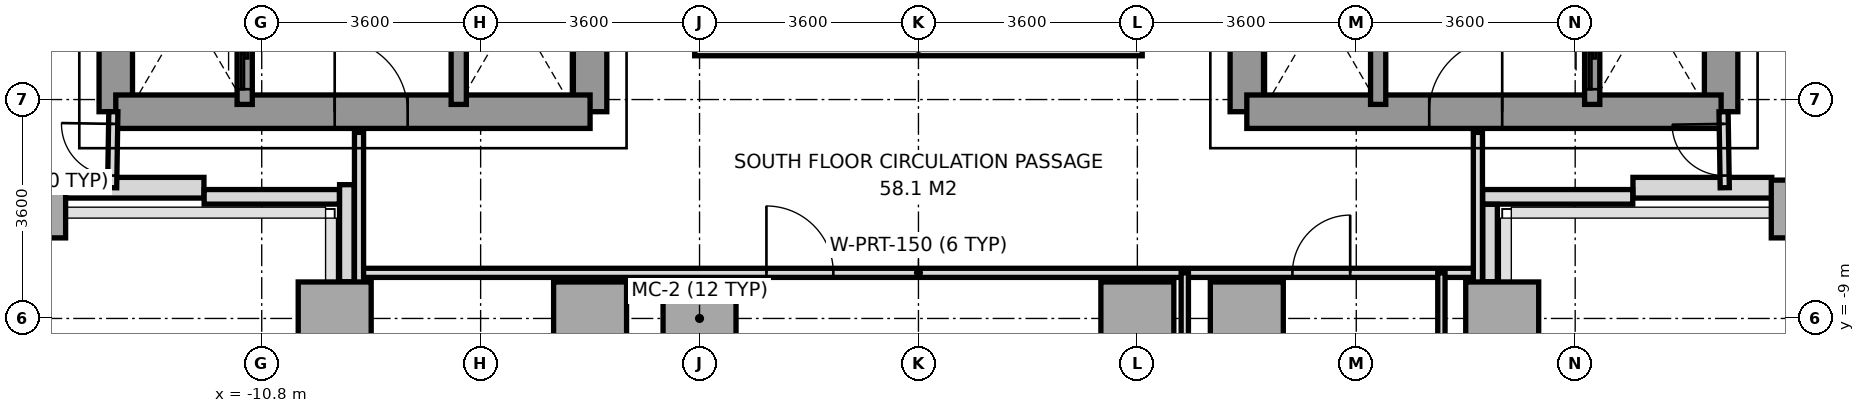
"""IFC4 building model, lengths in metres.
Left out: names, types, materials, properties, quantities, classifications, styles, units other than length and angle.
Written with IfcOpenShell. Run it as: python <this file> out.ifc"""

import sys

from ifc_helpers import new_model, si_unit, direction, frame, frame_2d, origin, origin_2d, place, context, subcontext, project, spatial, rectangle, extrude, source, transform, mapped, element, fill, save


model = new_model("IFC4")
c1 = context("Model", 3, precision=1e-05, world=origin(), true_north=direction((0.0, 1.0)))
c2 = subcontext(c1, "Body", "Model", "MODEL_VIEW")
j1 = project(units=[si_unit("LENGTHUNIT", "METRE"), si_unit("PLANEANGLEUNIT", "RADIAN")], contexts=[c1])
p1 = place(None, origin())
s1 = spatial("IfcSite", under=j1, at=p1, CompositionType="ELEMENT")
p2 = place(p1, origin())
s2 = spatial("IfcBuilding", under=s1, at=p2, CompositionType="ELEMENT")
p3 = place(p2, frame((0.0, 0.0, 64.6)))
s3 = spatial("IfcBuildingStorey", under=s2, at=p3, CompositionType="ELEMENT", Elevation=64.6)
m1 = source(origin(), c2, "Body", "SweptSolid", [
    extrude(rectangle(XDim=0.75, YDim=0.95, at=origin_2d()), origin(), (0.0, 0.0, 1.0), 3.2),
])
p4 = place(p3, frame((-14.4, -7.2, 0.0), z_axis=(0.0, 0.0, 1.0), x_axis=(1.0, 0.0, 0.0)))
e1 = element("IfcColumn", 1, at=p4, inside=s3, PredefinedType="COLUMN", context=c2, shape_type="MappedRepresentation", body=[
    mapped(m1, transform((0.0, 0.0, 0.0), x_axis=(1.0, 0.0, 0.0), y_axis=(0.0, 1.0, 0.0), z_axis=(0.0, 0.0, 1.0), scale=1.0)),
])
m2 = source(origin(), c2, "Body", "SweptSolid", [
    extrude(rectangle(XDim=1.2, YDim=1.2, at=origin_2d()), origin(), (0.0, 0.0, 1.0), 3.2),
])
for number, where, z_axis, x_axis in (
    (2, (-9.6, -9.0, 0.0), (0.0, 0.0, 1.0), (1.0, 0.0, 0.0)),
    (3, (-5.4, -9.0, 0.0), (0.0, 0.0, 1.0), (1.0, 0.0, 0.0)),
    (4, (-3.6, -9.0, 0.0), (0.0, 0.0, 1.0), (1.0, 0.0, 0.0)),
    (5, (3.6, -9.0, 0.0), (0.0, 0.0, 1.0), (1.0, 0.0, 0.0)),
    (6, (5.4, -9.0, 0.0), (0.0, 0.0, 1.0), (1.0, 0.0, 0.0)),
    (7, (9.6, -9.0, 0.0), (0.0, 0.0, 1.0), (1.0, 0.0, 0.0)),
):
    element("IfcColumn", number, at=place(p3, frame(where, z_axis=z_axis, x_axis=x_axis)), inside=s3, PredefinedType="COLUMN", context=c2, shape_type="MappedRepresentation", body=[
        mapped(m2, transform((0.0, 0.0, 0.0), x_axis=(1.0, 0.0, 0.0), y_axis=(0.0, 1.0, 0.0), z_axis=(0.0, 0.0, 1.0), scale=1.0)),
    ])
p5 = place(p3, frame((14.4, -7.2, 0.0), z_axis=(0.0, 0.0, 1.0), x_axis=(1.0, 0.0, 0.0)))
e8 = element("IfcColumn", 8, at=p5, inside=s3, PredefinedType="COLUMN", context=c2, shape_type="MappedRepresentation", body=[
    mapped(m1, transform((0.0, 0.0, 0.0), x_axis=(1.0, 0.0, 0.0), y_axis=(0.0, 1.0, 0.0), z_axis=(0.0, 0.0, 1.0), scale=1.0)),
])
for number, where, z_axis, x_axis in (
    (9, (-14.033, -6.85, 0.0), (0.0, 0.0, 1.0), (1.0, 0.0, 0.0)),
    (10, (11.75, -6.85, 0.0), (0.0, 0.0, 1.0), (1.0, 0.0, 0.0)),
):
    element("IfcWall", number, at=place(p3, frame(where, z_axis=z_axis, x_axis=x_axis)), inside=s3, PredefinedType="SOLIDWALL", context=c2, shape_type="SweptSolid", body=[
        extrude(rectangle(XDim=2.283, YDim=0.34, at=frame_2d((1.142, 0.0))), origin(), (0.0, 0.0, 1.0), 3.2),
    ])
p6 = place(p3, frame((11.747, -7.0, 0.0), z_axis=(0.0, 0.0, 1.0), x_axis=(-1.0, 0.0, 0.0)))
e11 = element("IfcWall", 11, at=p6, inside=s3, PredefinedType="PARAPET", context=c2, shape_type="SweptSolid", body=[
    extrude(rectangle(XDim=2.469, YDim=0.24, at=frame_2d((1.234, 0.0))), origin(), (0.0, 0.0, 1.0), 1.15),
])
p7 = place(p3, frame((9.4, -7.123, 0.0), z_axis=(0.0, 0.0, 1.0), x_axis=(0.0, -1.0, 0.0)))
e12 = element("IfcWall", 12, at=p7, inside=s3, PredefinedType="PARAPET", context=c2, shape_type="SweptSolid", body=[
    extrude(rectangle(XDim=1.274, YDim=0.24, at=frame_2d((0.637, 0.0))), origin(), (0.0, 0.0, 1.0), 1.15),
])
p8 = place(p3, frame((-9.4, -8.397, 0.0), z_axis=(0.0, 0.0, 1.0), x_axis=(0.0, 1.0, 0.0)))
e13 = element("IfcWall", 13, at=p8, inside=s3, PredefinedType="PARAPET", context=c2, shape_type="SweptSolid", body=[
    extrude(rectangle(XDim=1.597, YDim=0.24, at=frame_2d((0.798, 0.0))), origin(), (0.0, 0.0, 1.0), 1.15),
])
p9 = place(p3, frame((-9.523, -7.0, 0.0), z_axis=(0.0, 0.0, 1.0), x_axis=(-1.0, 0.0, 0.0)))
e14 = element("IfcWall", 14, at=p9, inside=s3, PredefinedType="PARAPET", context=c2, shape_type="SweptSolid", body=[
    extrude(rectangle(XDim=2.224, YDim=0.24, at=frame_2d((1.112, 0.0))), origin(), (0.0, 0.0, 1.0), 1.15),
])
p10 = place(p3, frame((-13.2, -5.6, 0.0), z_axis=(0.0, 0.0, 1.0), x_axis=(0.0, 1.0, 0.0)))
e15 = element("IfcWall", 15, at=p10, inside=s3, PredefinedType="SHEAR", context=c2, shape_type="SweptSolid", body=[
    extrude(rectangle(XDim=11.2, YDim=0.55, at=frame_2d((5.6, 0.0))), origin(), (0.0, 0.0, 1.0), 3.2),
])
p11 = place(p3, frame((-5.4, -5.6, 0.0), z_axis=(0.0, 0.0, 1.0), x_axis=(0.0, 1.0, 0.0)))
e16 = element("IfcWall", 16, at=p11, inside=s3, PredefinedType="SHEAR", context=c2, shape_type="SweptSolid", body=[
    extrude(rectangle(XDim=12.5, YDim=0.55, at=frame_2d((6.25, 0.0))), origin(), (0.0, 0.0, 1.0), 3.2),
])
p12 = place(p11, frame((4.55, 0.0, 0.0)))
e17 = element("IfcOpeningElement", 17, at=p12, cuts=e16, PredefinedType="OPENING", context=c2, shape_type="SweptSolid", body=[
    extrude(rectangle(XDim=1.2, YDim=2.2, at=frame_2d((0.6, 1.1))), frame((0.0, 0.285, 0.0), z_axis=(0.0, -1.0, 0.0), x_axis=(1.0, 0.0, 0.0)), (0.0, 0.0, 1.0), 0.57),
])
p13 = place(p3, frame((-13.2, -5.6, 0.0), z_axis=(0.0, 0.0, 1.0), x_axis=(1.0, 0.0, 0.0)))
e18 = element("IfcWall", 18, at=p13, inside=s3, PredefinedType="SHEAR", context=c2, shape_type="SweptSolid", body=[
    extrude(rectangle(XDim=7.8, YDim=0.55, at=frame_2d((3.9, 0.0))), origin(), (0.0, 0.0, 1.0), 3.2),
])
p14 = place(p13, frame((3.6, 0.0, 0.0)))
e19 = element("IfcOpeningElement", 19, at=p14, cuts=e18, PredefinedType="OPENING", context=c2, shape_type="SweptSolid", body=[
    extrude(rectangle(XDim=1.2, YDim=2.2, at=frame_2d((0.6, 1.1))), frame((0.0, 0.285, 0.0), z_axis=(0.0, -1.0, 0.0), x_axis=(1.0, 0.0, 0.0)), (0.0, 0.0, 1.0), 0.57),
])
p15 = place(p3, frame((13.2, -5.6, 0.0), z_axis=(0.0, 0.0, 1.0), x_axis=(0.0, 1.0, 0.0)))
e20 = element("IfcWall", 20, at=p15, inside=s3, PredefinedType="SHEAR", context=c2, shape_type="SweptSolid", body=[
    extrude(rectangle(XDim=11.2, YDim=0.55, at=frame_2d((5.6, 0.0))), origin(), (0.0, 0.0, 1.0), 3.2),
])
p16 = place(p3, frame((5.4, -5.6, 0.0), z_axis=(0.0, 0.0, 1.0), x_axis=(0.0, 1.0, 0.0)))
e21 = element("IfcWall", 21, at=p16, inside=s3, PredefinedType="SHEAR", context=c2, shape_type="SweptSolid", body=[
    extrude(rectangle(XDim=12.5, YDim=0.55, at=frame_2d((6.25, 0.0))), origin(), (0.0, 0.0, 1.0), 3.2),
])
p17 = place(p16, frame((4.55, 0.0, 0.0)))
e22 = element("IfcOpeningElement", 22, at=p17, cuts=e21, PredefinedType="OPENING", context=c2, shape_type="SweptSolid", body=[
    extrude(rectangle(XDim=1.2, YDim=2.2, at=frame_2d((0.6, 1.1))), frame((0.0, 0.285, 0.0), z_axis=(0.0, -1.0, 0.0), x_axis=(1.0, 0.0, 0.0)), (0.0, 0.0, 1.0), 0.57),
])
p18 = place(p16, frame((7.88, 0.0, 0.0)))
e23 = element("IfcOpeningElement", 23, at=p18, cuts=e21, PredefinedType="OPENING", context=c2, shape_type="SweptSolid", body=[
    extrude(rectangle(XDim=0.8, YDim=2.1, at=frame_2d((0.4, 1.05))), frame((0.0, 0.285, 0.0), z_axis=(0.0, -1.0, 0.0), x_axis=(1.0, 0.0, 0.0)), (0.0, 0.0, 1.0), 0.57),
])
p19 = place(p3, frame((5.4, -5.6, 0.0), z_axis=(0.0, 0.0, 1.0), x_axis=(1.0, 0.0, 0.0)))
e24 = element("IfcWall", 24, at=p19, inside=s3, PredefinedType="SHEAR", context=c2, shape_type="SweptSolid", body=[
    extrude(rectangle(XDim=7.8, YDim=0.55, at=frame_2d((3.9, 0.0))), origin(), (0.0, 0.0, 1.0), 3.2),
])
p20 = place(p19, frame((3.0, 0.0, 0.0)))
e25 = element("IfcOpeningElement", 25, at=p20, cuts=e24, PredefinedType="OPENING", context=c2, shape_type="SweptSolid", body=[
    extrude(rectangle(XDim=1.2, YDim=2.2, at=frame_2d((0.6, 1.1))), frame((0.0, 0.285, 0.0), z_axis=(0.0, -1.0, 0.0), x_axis=(1.0, 0.0, 0.0)), (0.0, 0.0, 1.0), 0.57),
])
p21 = place(p3, frame((-11.08, -5.48, 0.0), z_axis=(0.0, 0.0, 1.0), x_axis=(0.0, 1.0, 0.0)))
e26 = element("IfcWall", 26, at=p21, inside=s3, PredefinedType="SOLIDWALL", context=c2, shape_type="SweptSolid", body=[
    extrude(rectangle(XDim=1.6, YDim=0.25, at=frame_2d((0.8, 0.0))), origin(), (0.0, 0.0, 1.0), 3.2),
])
p22 = place(p21, frame((0.25, 0.0, 0.0)))
e27 = element("IfcOpeningElement", 27, at=p22, cuts=e26, PredefinedType="OPENING", context=c2, shape_type="SweptSolid", body=[
    extrude(rectangle(XDim=1.1, YDim=2.2, at=frame_2d((0.55, 1.1))), frame((0.0, 0.135, 0.0), z_axis=(0.0, -1.0, 0.0), x_axis=(1.0, 0.0, 0.0)), (0.0, 0.0, 1.0), 0.27),
])
p23 = place(p3, frame((11.08, -5.48, 0.0), z_axis=(0.0, 0.0, 1.0), x_axis=(0.0, 1.0, 0.0)))
e28 = element("IfcWall", 28, at=p23, inside=s3, PredefinedType="SOLIDWALL", context=c2, shape_type="SweptSolid", body=[
    extrude(rectangle(XDim=1.6, YDim=0.25, at=frame_2d((0.8, 0.0))), origin(), (0.0, 0.0, 1.0), 3.2),
])
p24 = place(p23, frame((0.25, 0.0, 0.0)))
e29 = element("IfcOpeningElement", 29, at=p24, cuts=e28, PredefinedType="OPENING", context=c2, shape_type="SweptSolid", body=[
    extrude(rectangle(XDim=1.1, YDim=2.2, at=frame_2d((0.55, 1.1))), frame((0.0, 0.135, 0.0), z_axis=(0.0, -1.0, 0.0), x_axis=(1.0, 0.0, 0.0)), (0.0, 0.0, 1.0), 0.27),
])
for number, where, z_axis, x_axis in (
    (30, (-7.56, -5.48, 0.0), (0.0, 0.0, 1.0), (0.0, 1.0, 0.0)),
    (31, (7.56, -5.48, 0.0), (0.0, 0.0, 1.0), (0.0, 1.0, 0.0)),
):
    element("IfcWall", number, at=place(p3, frame(where, z_axis=z_axis, x_axis=x_axis)), inside=s3, PredefinedType="SOLIDWALL", context=c2, shape_type="SweptSolid", body=[
        extrude(rectangle(XDim=1.6, YDim=0.25, at=frame_2d((0.8, 0.0))), origin(), (0.0, 0.0, 1.0), 3.2),
    ])
p25 = place(p3, frame((-9.2, -8.25, 0.0), z_axis=(0.0, 0.0, 1.0), x_axis=(1.0, 0.0, 0.0)))
e32 = element("IfcWall", 32, at=p25, inside=s3, PredefinedType="PARTITIONING", context=c2, shape_type="SweptSolid", body=[
    extrude(rectangle(XDim=18.4, YDim=0.15, at=frame_2d((9.2, 0.0))), origin(), (0.0, 0.0, 1.0), 2.7),
])
p26 = place(p25, frame((15.35, 0.0, 0.0)))
e33 = element("IfcOpeningElement", 33, at=p26, cuts=e32, PredefinedType="OPENING", context=c2, shape_type="SweptSolid", body=[
    extrude(rectangle(XDim=0.95, YDim=2.15, at=frame_2d((0.475, 1.075))), frame((0.0, 0.085, 0.0), z_axis=(0.0, -1.0, 0.0), x_axis=(1.0, 0.0, 0.0)), (0.0, 0.0, 1.0), 0.17),
])
p27 = place(p25, frame((6.7, 0.0, 0.0)))
e34 = element("IfcOpeningElement", 34, at=p27, cuts=e32, PredefinedType="OPENING", context=c2, shape_type="SweptSolid", body=[
    extrude(rectangle(XDim=1.1, YDim=2.2, at=frame_2d((0.55, 1.1))), frame((0.0, 0.085, 0.0), z_axis=(0.0, -1.0, 0.0), x_axis=(1.0, 0.0, 0.0)), (0.0, 0.0, 1.0), 0.17),
])
for number, where, z_axis, x_axis in (
    (35, (-9.2, -15.68, 0.0), (0.0, 0.0, 1.0), (0.0, 1.0, 0.0)),
    (36, (9.2, -15.68, 0.0), (0.0, 0.0, 1.0), (0.0, 1.0, 0.0)),
):
    element("IfcWall", number, at=place(p3, frame(where, z_axis=z_axis, x_axis=x_axis)), inside=s3, PredefinedType="PARTITIONING", context=c2, shape_type="SweptSolid", body=[
        extrude(rectangle(XDim=9.74, YDim=0.15, at=frame_2d((4.87, 0.0))), origin(), (0.0, 0.0, 1.0), 2.65),
    ])
p28 = place(p3, frame((4.38, -11.8, 0.0), z_axis=(0.0, 0.0, 1.0), x_axis=(0.0, 1.0, 0.0)))
e37 = element("IfcWall", 37, at=p28, inside=s3, PredefinedType="PARTITIONING", context=c2, shape_type="SweptSolid", body=[
    extrude(rectangle(XDim=3.55, YDim=0.12, at=frame_2d((1.775, 0.0))), origin(), (0.0, 0.0, 1.0), 3.2),
])
p29 = place(p3, frame((8.6, -11.8, 0.0), z_axis=(0.0, 0.0, 1.0), x_axis=(0.0, 1.0, 0.0)))
e38 = element("IfcWall", 38, at=p29, inside=s3, PredefinedType="PARTITIONING", context=c2, shape_type="SweptSolid", body=[
    extrude(rectangle(XDim=3.55, YDim=0.12, at=frame_2d((1.775, 0.0))), origin(), (0.0, 0.0, 1.0), 2.65),
])
p30 = place(p3, frame((-13.26, -6.85, 0.0), z_axis=(0.0, 0.0, 1.0), x_axis=(0.016013571389, 0.999871774545, 0.0)))
e39 = element("IfcWall", 39, at=p30, inside=s3, PredefinedType="PARTITIONING", context=c2, shape_type="SweptSolid", body=[
    extrude(rectangle(XDim=1.25, YDim=0.15, at=frame_2d((0.625, 0.0))), origin(), (0.0, 0.0, 1.0), 3.2),
])
p31 = place(p30, frame((0.2, 0.0, 0.0)))
e40 = element("IfcOpeningElement", 40, at=p31, cuts=e39, PredefinedType="OPENING", context=c2, shape_type="SweptSolid", body=[
    extrude(rectangle(XDim=0.85, YDim=2.1, at=frame_2d((0.425, 1.05))), frame((0.0, 0.085, 0.0), z_axis=(0.0, -1.0, 0.0), x_axis=(1.0, 0.0, 0.0)), (0.0, 0.0, 1.0), 0.17),
])
p32 = place(p3, frame((13.26, -6.85, 0.0), z_axis=(0.0, 0.0, 1.0), x_axis=(-0.016013571389, 0.999871774545, 0.0)))
e41 = element("IfcWall", 41, at=p32, inside=s3, PredefinedType="PARTITIONING", context=c2, shape_type="SweptSolid", body=[
    extrude(rectangle(XDim=1.25, YDim=0.15, at=frame_2d((0.625, 0.0))), origin(), (0.0, 0.0, 1.0), 3.2),
])
p33 = place(p32, frame((0.2, 0.0, 0.0)))
e42 = element("IfcOpeningElement", 42, at=p33, cuts=e41, PredefinedType="OPENING", context=c2, shape_type="SweptSolid", body=[
    extrude(rectangle(XDim=0.85, YDim=2.1, at=frame_2d((0.425, 1.05))), frame((0.0, 0.085, 0.0), z_axis=(0.0, -1.0, 0.0), x_axis=(1.0, 0.0, 0.0)), (0.0, 0.0, 1.0), 0.17),
])
p34 = place(p3, frame((-3.68, -4.56, 0.0), z_axis=(0.0, 0.0, 1.0), x_axis=(1.0, 0.0, 0.0)))
e43 = element("IfcWall", 43, at=p34, inside=s3, PredefinedType="PARAPET", context=c2, shape_type="SweptSolid", body=[
    extrude(rectangle(XDim=7.36, YDim=0.24, at=frame_2d((3.68, 0.0))), origin(), (0.0, 0.0, 1.0), 1.15),
])
m3 = source(origin(), c2, "Body", "SweptSolid", [
    extrude(rectangle(XDim=1.2, YDim=2.2, at=frame_2d((0.6, 1.1))), frame((0.0, 0.025, 0.0), z_axis=(0.0, -1.0, 0.0), x_axis=(1.0, 0.0, 0.0)), (0.0, 0.0, 1.0), 0.05),
])
p35 = place(p14, origin())
e44 = element("IfcDoor", 44, at=p35, inside=s3, OperationType="SINGLE_SWING_LEFT", PredefinedType="DOOR", context=c2, shape_type="MappedRepresentation", body=[
    mapped(m3, transform((0.0, 0.0, 0.0), x_axis=(1.0, 0.0, 0.0), y_axis=(0.0, 1.0, 0.0), z_axis=(0.0, 0.0, 1.0), scale=1.0)),
])
fill(e19, e44)
p36 = place(p20, origin())
e45 = element("IfcDoor", 45, at=p36, inside=s3, OperationType="SINGLE_SWING_RIGHT", PredefinedType="DOOR", context=c2, shape_type="MappedRepresentation", body=[
    mapped(m3, transform((0.0, 0.0, 0.0), x_axis=(1.0, 0.0, 0.0), y_axis=(0.0, 1.0, 0.0), z_axis=(0.0, 0.0, 1.0), scale=1.0)),
])
fill(e25, e45)
m4 = source(origin(), c2, "Body", "SweptSolid", [
    extrude(rectangle(XDim=1.1, YDim=2.2, at=frame_2d((0.55, 1.1))), frame((0.0, 0.025, 0.0), z_axis=(0.0, -1.0, 0.0), x_axis=(1.0, 0.0, 0.0)), (0.0, 0.0, 1.0), 0.05),
])
p37 = place(p22, origin())
e46 = element("IfcDoor", 46, at=p37, inside=s3, OperationType="SLIDING_TO_LEFT", PredefinedType="DOOR", context=c2, shape_type="MappedRepresentation", body=[
    mapped(m4, transform((0.0, 0.0, 0.0), x_axis=(1.0, 0.0, 0.0), y_axis=(0.0, 1.0, 0.0), z_axis=(0.0, 0.0, 1.0), scale=1.0)),
])
fill(e27, e46)
p38 = place(p24, origin())
e47 = element("IfcDoor", 47, at=p38, inside=s3, OperationType="SLIDING_TO_LEFT", PredefinedType="DOOR", context=c2, shape_type="MappedRepresentation", body=[
    mapped(m4, transform((0.0, 0.0, 0.0), x_axis=(1.0, 0.0, 0.0), y_axis=(0.0, 1.0, 0.0), z_axis=(0.0, 0.0, 1.0), scale=1.0)),
])
fill(e29, e47)
m5 = source(origin(), c2, "Body", "SweptSolid", [
    extrude(rectangle(XDim=0.95, YDim=2.15, at=frame_2d((0.475, 1.075))), frame((0.0, 0.025, 0.0), z_axis=(0.0, -1.0, 0.0), x_axis=(1.0, 0.0, 0.0)), (0.0, 0.0, 1.0), 0.05),
])
p39 = place(p26, origin())
e48 = element("IfcDoor", 48, at=p39, inside=s3, OperationType="SINGLE_SWING_RIGHT", PredefinedType="DOOR", context=c2, shape_type="MappedRepresentation", body=[
    mapped(m5, transform((0.0, 0.0, 0.0), x_axis=(1.0, 0.0, 0.0), y_axis=(0.0, 1.0, 0.0), z_axis=(0.0, 0.0, 1.0), scale=1.0)),
])
fill(e33, e48)
p40 = place(p27, origin())
e49 = element("IfcDoor", 49, at=p40, inside=s3, OperationType="SINGLE_SWING_LEFT", PredefinedType="DOOR", context=c2, shape_type="MappedRepresentation", body=[
    mapped(m4, transform((0.0, 0.0, 0.0), x_axis=(1.0, 0.0, 0.0), y_axis=(0.0, 1.0, 0.0), z_axis=(0.0, 0.0, 1.0), scale=1.0)),
])
fill(e34, e49)
m6 = source(origin(), c2, "Body", "SweptSolid", [
    extrude(rectangle(XDim=0.85, YDim=2.1, at=frame_2d((0.425, 1.05))), frame((0.0, 0.025, 0.0), z_axis=(0.0, -1.0, 0.0), x_axis=(1.0, 0.0, 0.0)), (0.0, 0.0, 1.0), 0.05),
])
p41 = place(p31, origin())
e50 = element("IfcDoor", 50, at=p41, inside=s3, OperationType="SINGLE_SWING_RIGHT", PredefinedType="DOOR", context=c2, shape_type="MappedRepresentation", body=[
    mapped(m6, transform((0.0, 0.0, 0.0), x_axis=(1.0, 0.0, 0.0), y_axis=(0.0, 1.0, 0.0), z_axis=(0.0, 0.0, 1.0), scale=1.0)),
])
fill(e40, e50)
p42 = place(p33, origin())
e51 = element("IfcDoor", 51, at=p42, inside=s3, OperationType="SINGLE_SWING_RIGHT", PredefinedType="DOOR", context=c2, shape_type="MappedRepresentation", body=[
    mapped(m6, transform((0.0, 0.0, 0.0), x_axis=(1.0, 0.0, 0.0), y_axis=(0.0, 1.0, 0.0), z_axis=(0.0, 0.0, 1.0), scale=1.0)),
])
fill(e42, e51)
save(model, sys.argv[1])
